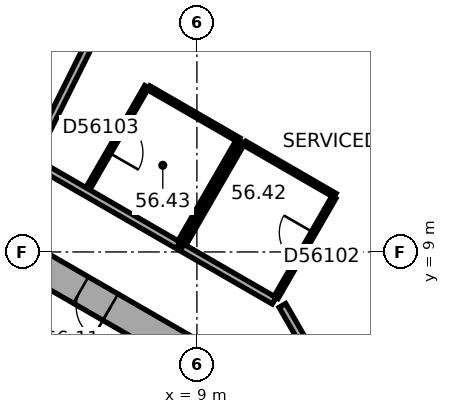
"""IFC4 building model, lengths in metres.
Left out: names, types, materials, properties, quantities, classifications, styles, units other than length and angle.
Written with IfcOpenShell. Run it as: python <this file> out.ifc"""

import sys

from ifc_helpers import new_model, si_unit, direction, frame, frame_2d, origin, place, context, subcontext, project, spatial, rectangle, extrude, element, fill, save


model = new_model("IFC4")
c1 = context("Model", 3, precision=1e-05, world=origin(), true_north=direction((0.0, 1.0)))
c2 = subcontext(c1, "Body", "Model", "MODEL_VIEW")
j1 = project(units=[si_unit("LENGTHUNIT", "METRE"), si_unit("PLANEANGLEUNIT", "RADIAN")], contexts=[c1])
p1 = place(None, origin())
s1 = spatial("IfcSite", under=j1, at=p1, CompositionType="ELEMENT")
p2 = place(p1, origin())
s2 = spatial("IfcBuilding", under=s1, at=p2, CompositionType="ELEMENT")
p3 = place(p2, frame((0.0, 0.0, 229.1)))
s3 = spatial("IfcBuildingStorey", under=s2, at=p3, CompositionType="ELEMENT", Elevation=229.1)
p4 = place(p3, frame((10.1, 5.6, 0.0), z_axis=(0.0, 0.0, 1.0), x_axis=(-0.866023897231, 0.500002609418, 0.0)))
e1 = element("IfcWall", 1, at=p4, inside=s3, PredefinedType="SHEAR", context=c2, shape_type="SweptSolid", body=[
    extrude(rectangle(XDim=11.894, YDim=0.8, at=frame_2d((5.947, 0.0))), origin(), (0.0, 0.0, 1.0), 3.7),
])
p5 = place(p4, frame((3.897, 0.0, 0.0)))
e2 = element("IfcOpeningElement", 2, at=p5, cuts=e1, PredefinedType="OPENING", context=c2, shape_type="SweptSolid", body=[
    extrude(rectangle(XDim=0.9, YDim=2.1, at=frame_2d((0.45, 1.05))), frame((0.0, 0.41, 0.0), z_axis=(0.0, -1.0, 0.0), x_axis=(1.0, 0.0, 0.0)), (0.0, 0.0, 1.0), 0.82),
])
p6 = place(p4, frame((7.797, 0.0, 0.0)))
e3 = element("IfcOpeningElement", 3, at=p6, cuts=e1, PredefinedType="OPENING", context=c2, shape_type="SweptSolid", body=[
    extrude(rectangle(XDim=0.9, YDim=2.1, at=frame_2d((0.45, 1.05))), frame((0.0, 0.41, 0.0), z_axis=(0.0, -1.0, 0.0), x_axis=(1.0, 0.0, 0.0)), (0.0, 0.0, 1.0), 0.82),
])
p7 = place(p3, frame((18.299, 13.727, 0.0), z_axis=(0.0, 0.0, 1.0), x_axis=(-0.894934554817, 0.44619742558, 0.0)))
e4 = element("IfcWall", 4, at=p7, inside=s3, PredefinedType="STANDARD", context=c2, shape_type="SweptSolid", body=[
    extrude(rectangle(XDim=18.841, YDim=0.2, at=frame_2d((9.421, 0.0))), origin(), (0.0, 0.0, 1.0), 3.7),
])
p8 = place(p7, frame((1.253, 0.0, 0.9)))
e5 = element("IfcOpeningElement", 5, at=p8, cuts=e4, PredefinedType="OPENING", context=c2, shape_type="SweptSolid", body=[
    extrude(rectangle(XDim=2.2, YDim=2.0, at=frame_2d((1.1, 1.0))), frame((0.0, 0.11, 0.0), z_axis=(0.0, -1.0, 0.0), x_axis=(1.0, 0.0, 0.0)), (0.0, 0.0, 1.0), 0.22),
])
p9 = place(p7, frame((4.786, 0.0, 0.9)))
e6 = element("IfcOpeningElement", 6, at=p9, cuts=e4, PredefinedType="OPENING", context=c2, shape_type="SweptSolid", body=[
    extrude(rectangle(XDim=2.2, YDim=2.0, at=frame_2d((1.1, 1.0))), frame((0.0, 0.11, 0.0), z_axis=(0.0, -1.0, 0.0), x_axis=(1.0, 0.0, 0.0)), (0.0, 0.0, 1.0), 0.22),
])
p10 = place(p7, frame((8.32, 0.0, 0.9)))
e7 = element("IfcOpeningElement", 7, at=p10, cuts=e4, PredefinedType="OPENING", context=c2, shape_type="SweptSolid", body=[
    extrude(rectangle(XDim=2.2, YDim=2.0, at=frame_2d((1.1, 1.0))), frame((0.0, 0.11, 0.0), z_axis=(0.0, -1.0, 0.0), x_axis=(1.0, 0.0, 0.0)), (0.0, 0.0, 1.0), 0.22),
])
p11 = place(p7, frame((11.854, 0.0, 0.9)))
e8 = element("IfcOpeningElement", 8, at=p11, cuts=e4, PredefinedType="OPENING", context=c2, shape_type="SweptSolid", body=[
    extrude(rectangle(XDim=2.2, YDim=2.0, at=frame_2d((1.1, 1.0))), frame((0.0, 0.11, 0.0), z_axis=(0.0, -1.0, 0.0), x_axis=(1.0, 0.0, 0.0)), (0.0, 0.0, 1.0), 0.22),
])
p12 = place(p7, frame((15.387, 0.0, 0.9)))
e9 = element("IfcOpeningElement", 9, at=p12, cuts=e4, PredefinedType="OPENING", context=c2, shape_type="SweptSolid", body=[
    extrude(rectangle(XDim=2.2, YDim=2.0, at=frame_2d((1.1, 1.0))), frame((0.0, 0.11, 0.0), z_axis=(0.0, -1.0, 0.0), x_axis=(1.0, 0.0, 0.0)), (0.0, 0.0, 1.0), 0.22),
])
p13 = place(p3, frame((7.424, 4.259, 0.0), z_axis=(0.0, 0.0, 1.0), x_axis=(-0.866026010844, 0.49999894854, 0.0)))
e10 = element("IfcWall", 10, at=p13, inside=s3, PredefinedType="PARTITIONING", context=c2, shape_type="SweptSolid", body=[
    extrude(rectangle(XDim=8.0, YDim=0.2, at=frame_2d((4.0, 0.0))), origin(), (0.0, 0.0, 1.0), 3.42),
])
p14 = place(p3, frame((6.303, 4.617, 0.0), z_axis=(0.0, 0.0, 1.0), x_axis=(-0.866027801685, 0.499995846692, 0.0)))
e11 = element("IfcWall", 11, at=p14, inside=s3, PredefinedType="SHEAR", context=c2, shape_type="SweptSolid", body=[
    extrude(rectangle(XDim=7.06, YDim=0.3, at=frame_2d((3.53, 0.0))), origin(), (0.0, 0.0, 1.0), 3.42),
])
p15 = place(p3, frame((6.13, 10.664, 0.0), z_axis=(0.0, 0.0, 1.0), x_axis=(0.499967891604, 0.866043940782, 0.0)))
e12 = element("IfcWall", 12, at=p15, inside=s3, PredefinedType="PARTITIONING", context=c2, shape_type="SweptSolid", body=[
    extrude(rectangle(XDim=3.1, YDim=0.12, at=frame_2d((1.55, 0.0))), origin(), (0.0, 0.0, 1.0), 3.42),
])
p16 = place(p15, frame((1.1, 0.0, 0.0)))
e13 = element("IfcOpeningElement", 13, at=p16, cuts=e12, PredefinedType="OPENING", context=c2, shape_type="SweptSolid", body=[
    extrude(rectangle(XDim=0.9, YDim=2.1, at=frame_2d((0.45, 1.05))), frame((0.0, 0.07, 0.0), z_axis=(0.0, -1.0, 0.0), x_axis=(1.0, 0.0, 0.0)), (0.0, 0.0, 1.0), 0.14),
])
p17 = place(p3, frame((7.732, 13.318, 0.0), z_axis=(0.0, 0.0, 1.0), x_axis=(0.866057988685, -0.499943557049, 0.0)))
e14 = element("IfcWall", 14, at=p17, inside=s3, PredefinedType="PARTITIONING", context=c2, shape_type="SweptSolid", body=[
    extrude(rectangle(XDim=2.74, YDim=0.12, at=frame_2d((1.37, 0.0))), origin(), (0.0, 0.0, 1.0), 3.42),
])
p18 = place(p3, frame((7.886, 17.913, 0.0), z_axis=(0.0, 0.0, 1.0), x_axis=(-0.446204015428, -0.894931269213, 0.0)))
e15 = element("IfcWall", 15, at=p18, inside=s3, PredefinedType="PARTITIONING", context=c2, shape_type="SweptSolid", body=[
    extrude(rectangle(XDim=7.16, YDim=0.2, at=frame_2d((3.58, 0.0))), origin(), (0.0, 0.0, 1.0), 3.42),
])
p19 = place(p3, frame((8.505, 9.177, 0.0), z_axis=(0.0, 0.0, 1.0), x_axis=(-0.866019839902, 0.500009636803, 0.0)))
e16 = element("IfcWall", 16, at=p19, inside=s3, PredefinedType="PARTITIONING", context=c2, shape_type="SweptSolid", body=[
    extrude(rectangle(XDim=8.683, YDim=0.2, at=frame_2d((4.342, 0.0))), origin(), (0.0, 0.0, 1.0), 3.42),
])
p20 = place(p19, frame((5.73, 0.0, 0.0)))
e17 = element("IfcOpeningElement", 17, at=p20, cuts=e16, PredefinedType="OPENING", context=c2, shape_type="SweptSolid", body=[
    extrude(rectangle(XDim=1.0, YDim=2.1, at=frame_2d((0.5, 1.05))), frame((0.0, 0.11, 0.0), z_axis=(0.0, -1.0, 0.0), x_axis=(1.0, 0.0, 0.0)), (0.0, 0.0, 1.0), 0.22),
])
p21 = place(p3, frame((8.659, 9.204, 0.0), z_axis=(0.0, 0.0, 1.0), x_axis=(0.499933790963, 0.866063626216, 0.0)))
e18 = element("IfcWall", 18, at=p21, inside=s3, PredefinedType="PARTITIONING", context=c2, shape_type="SweptSolid", body=[
    extrude(rectangle(XDim=3.1, YDim=0.12, at=frame_2d((1.55, 0.0))), origin(), (0.0, 0.0, 1.0), 3.42),
])
p22 = place(p3, frame((10.075, 11.896, 0.0), z_axis=(0.0, 0.0, 1.0), x_axis=(-0.499991248344, -0.866030456496, 0.0)))
e19 = element("IfcWall", 19, at=p22, inside=s3, PredefinedType="PARTITIONING", context=c2, shape_type="SweptSolid", body=[
    extrude(rectangle(XDim=3.04, YDim=0.12, at=frame_2d((1.52, 0.0))), origin(), (0.0, 0.0, 1.0), 3.42),
])
p23 = place(p3, frame((10.26, 11.858, 0.0), z_axis=(0.0, 0.0, 1.0), x_axis=(0.866019409031, -0.500010383074, 0.0)))
e20 = element("IfcWall", 20, at=p23, inside=s3, PredefinedType="PARTITIONING", context=c2, shape_type="SweptSolid", body=[
    extrude(rectangle(XDim=2.74, YDim=0.12, at=frame_2d((1.37, 0.0))), origin(), (0.0, 0.0, 1.0), 3.42),
])
p24 = place(p3, frame((11.033, 7.717, 0.0), z_axis=(0.0, 0.0, 1.0), x_axis=(-0.865996816683, 0.500049511043, 0.0)))
e21 = element("IfcWall", 21, at=p24, inside=s3, PredefinedType="PARTITIONING", context=c2, shape_type="SweptSolid", body=[
    extrude(rectangle(XDim=2.8, YDim=0.2, at=frame_2d((1.4, 0.0))), origin(), (0.0, 0.0, 1.0), 3.42),
])
p25 = place(p3, frame((12.18, 5.981, 0.0), z_axis=(0.0, 0.0, 1.0), x_axis=(-0.499964847546, 0.866045698112, 0.0)))
e22 = element("IfcWall", 22, at=p25, inside=s3, PredefinedType="PARTITIONING", context=c2, shape_type="SweptSolid", body=[
    extrude(rectangle(XDim=1.86, YDim=0.2, at=frame_2d((0.93, 0.0))), origin(), (0.0, 0.0, 1.0), 3.42),
])
p26 = place(p3, frame((12.604, 10.436, 0.0), z_axis=(0.0, 0.0, 1.0), x_axis=(-0.500026023896, -0.86601037836, 0.0)))
e23 = element("IfcWall", 23, at=p26, inside=s3, PredefinedType="PARTITIONING", context=c2, shape_type="SweptSolid", body=[
    extrude(rectangle(XDim=3.04, YDim=0.12, at=frame_2d((1.52, 0.0))), origin(), (0.0, 0.0, 1.0), 3.42),
])
p27 = place(p26, frame((1.07, 0.0, 0.0)))
e24 = element("IfcOpeningElement", 24, at=p27, cuts=e23, PredefinedType="OPENING", context=c2, shape_type="SweptSolid", body=[
    extrude(rectangle(XDim=0.9, YDim=2.1, at=frame_2d((0.45, 1.05))), frame((0.0, 0.07, 0.0), z_axis=(0.0, -1.0, 0.0), x_axis=(1.0, 0.0, 0.0)), (0.0, 0.0, 1.0), 0.14),
])
p28 = place(p5, origin())
e25 = element("IfcDoor", 25, at=p28, inside=s3, OperationType="SINGLE_SWING_LEFT", PredefinedType="DOOR", context=c2, shape_type="SweptSolid", body=[
    extrude(rectangle(XDim=0.9, YDim=2.1, at=frame_2d((0.45, 1.05))), frame((0.0, 0.025, 0.0), z_axis=(0.0, -1.0, 0.0), x_axis=(1.0, 0.0, 0.0)), (0.0, 0.0, 1.0), 0.05),
])
fill(e2, e25)
p29 = place(p27, origin())
e26 = element("IfcDoor", 26, at=p29, inside=s3, OperationType="SINGLE_SWING_LEFT", PredefinedType="DOOR", context=c2, shape_type="SweptSolid", body=[
    extrude(rectangle(XDim=0.9, YDim=2.1, at=frame_2d((0.45, 1.05))), frame((0.0, 0.025, 0.0), z_axis=(0.0, -1.0, 0.0), x_axis=(1.0, 0.0, 0.0)), (0.0, 0.0, 1.0), 0.05),
])
fill(e24, e26)
p30 = place(p16, origin())
e27 = element("IfcDoor", 27, at=p30, inside=s3, OperationType="SINGLE_SWING_LEFT", PredefinedType="DOOR", context=c2, shape_type="SweptSolid", body=[
    extrude(rectangle(XDim=0.9, YDim=2.1, at=frame_2d((0.45, 1.05))), frame((0.0, 0.025, 0.0), z_axis=(0.0, -1.0, 0.0), x_axis=(1.0, 0.0, 0.0)), (0.0, 0.0, 1.0), 0.05),
])
fill(e13, e27)
save(model, sys.argv[1])
